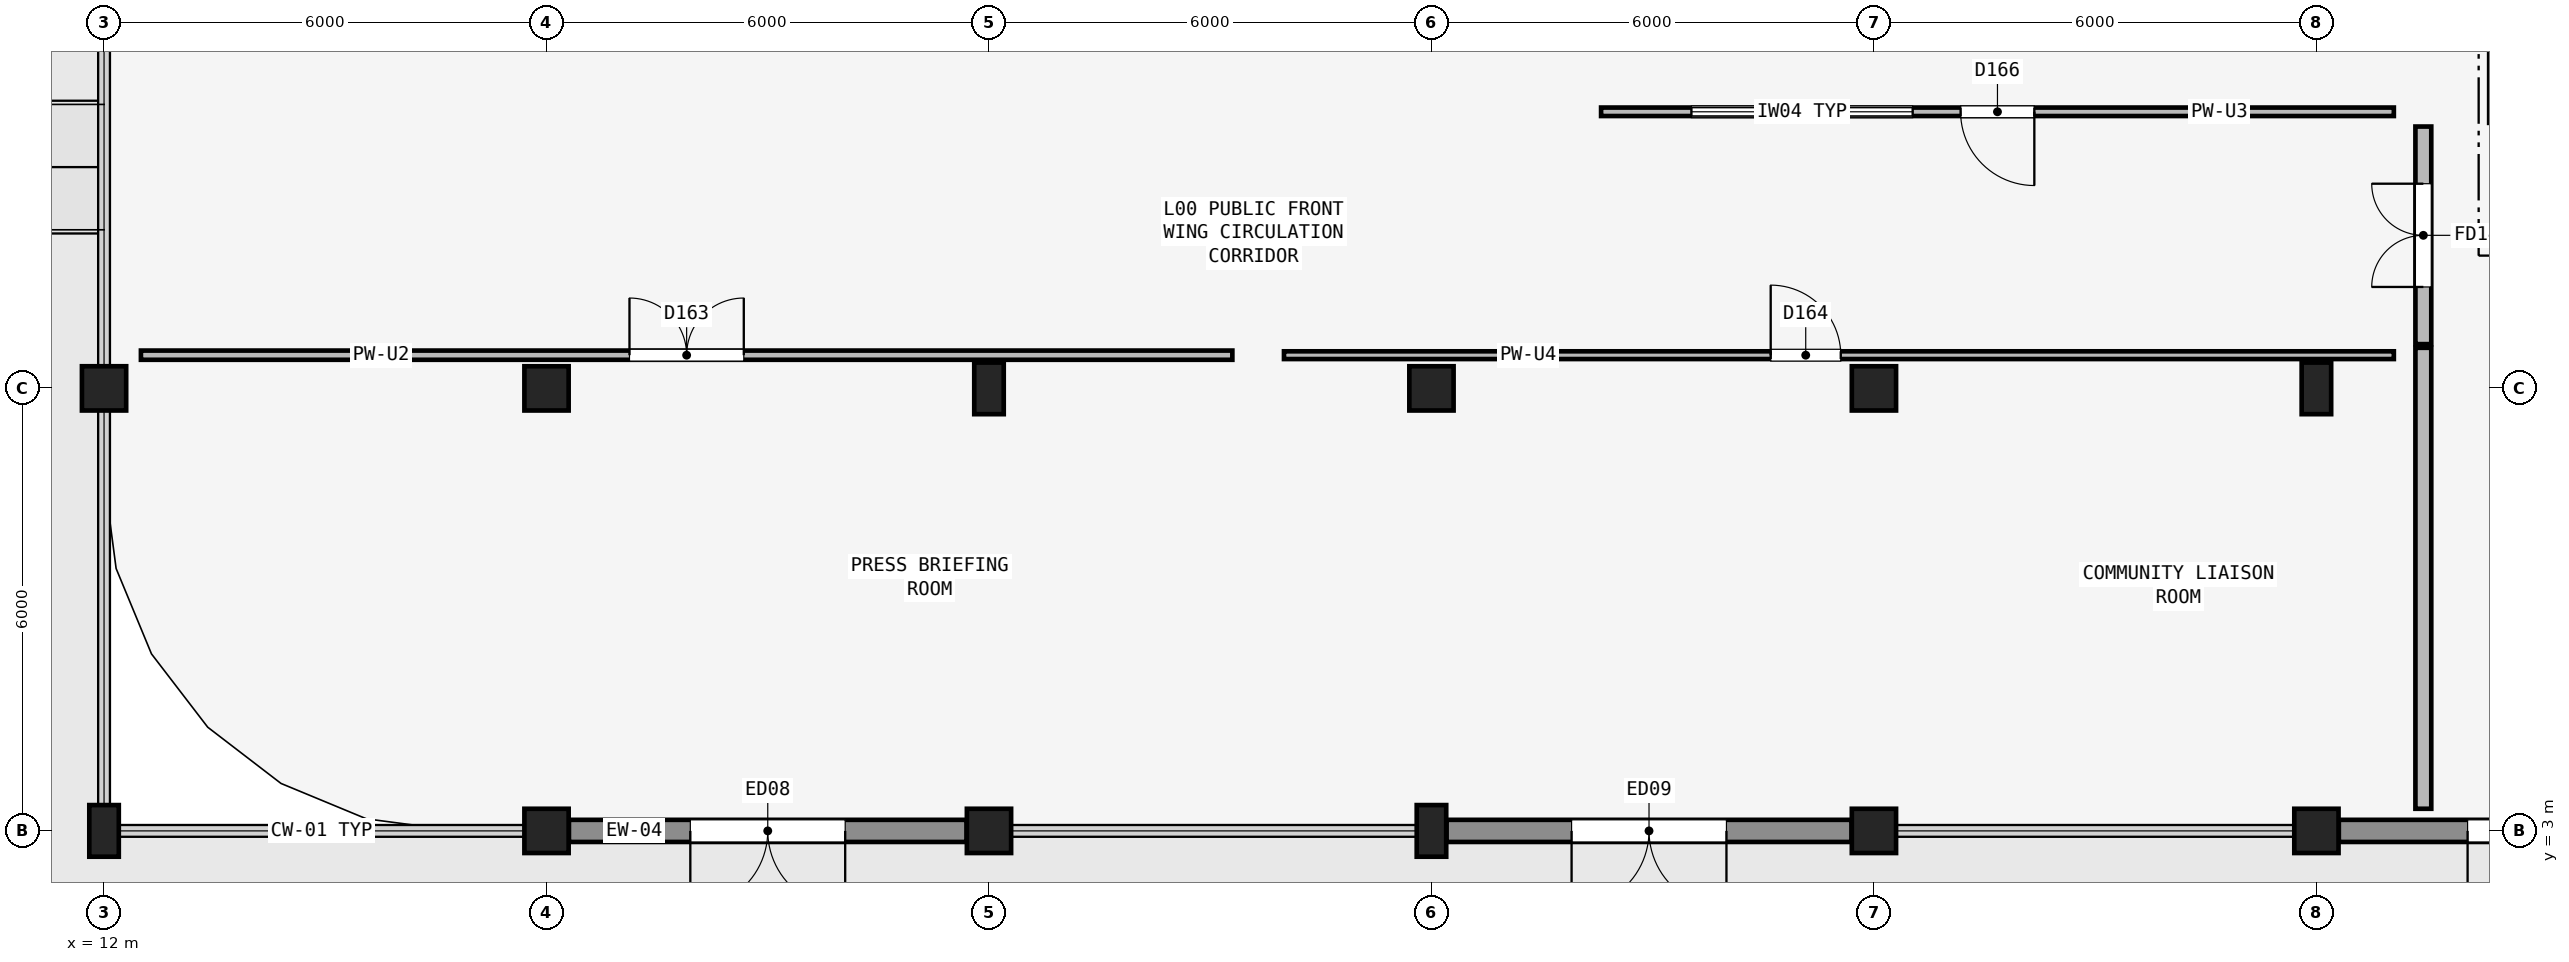
"""IFC4 building model, lengths in metres.
Left out: names, types, materials, properties, quantities, classifications, styles, units other than length and angle.
Written with IfcOpenShell. Run it as: python <this file> out.ifc"""

import sys

from ifc_helpers import new_model, si_unit, direction, frame, frame_2d, origin, origin_2d, place, context, subcontext, project, spatial, rectangle, extrude, element, fill, save


model = new_model("IFC4")
c1 = context("Model", 3, precision=1e-05, world=origin(), true_north=direction((0.0, 1.0)))
c2 = subcontext(c1, "Body", "Model", "MODEL_VIEW")
j1 = project(units=[si_unit("LENGTHUNIT", "METRE"), si_unit("PLANEANGLEUNIT", "RADIAN")], contexts=[c1])
p1 = place(None, origin())
s1 = spatial("IfcSite", under=j1, at=p1, CompositionType="ELEMENT")
p2 = place(p1, origin())
s2 = spatial("IfcBuilding", under=s1, at=p2, CompositionType="ELEMENT")
p3 = place(p2, origin())
s3 = spatial("IfcBuildingStorey", under=s2, at=p3, CompositionType="ELEMENT", Elevation=0.0)
p4 = place(p3, frame((12.0, 3.0, 0.0), z_axis=(0.0, 0.0, 1.0), x_axis=(1.0, 0.0, 0.0)))
e1 = element("IfcColumn", 1, at=p4, inside=s3, PredefinedType="COLUMN", context=c2, shape_type="SweptSolid", body=[
    extrude(rectangle(XDim=0.4, YDim=0.7, at=origin_2d()), origin(), (0.0, 0.0, 1.0), 4.8),
])
for number, where, z_axis, x_axis in (
    (2, (12.0, 9.0, 0.0), (0.0, 0.0, 1.0), (1.0, 0.0, 0.0)),
    (3, (18.0, 3.0, 0.0), (0.0, 0.0, 1.0), (1.0, 0.0, 0.0)),
    (4, (18.0, 9.0, 0.0), (0.0, 0.0, 1.0), (1.0, 0.0, 0.0)),
    (5, (24.0, 3.0, 0.0), (0.0, 0.0, 1.0), (1.0, 0.0, 0.0)),
):
    element("IfcColumn", number, at=place(p3, frame(where, z_axis=z_axis, x_axis=x_axis)), inside=s3, PredefinedType="COLUMN", context=c2, shape_type="SweptSolid", body=[
        extrude(rectangle(XDim=0.6, YDim=0.6, at=origin_2d()), origin(), (0.0, 0.0, 1.0), 4.8),
    ])
for number, where, z_axis, x_axis in (
    (6, (24.0, 9.0, 0.0), (0.0, 0.0, 1.0), (1.0, 0.0, 0.0)),
    (7, (30.0, 3.0, 0.0), (0.0, 0.0, 1.0), (1.0, 0.0, 0.0)),
):
    element("IfcColumn", number, at=place(p3, frame(where, z_axis=z_axis, x_axis=x_axis)), inside=s3, PredefinedType="COLUMN", context=c2, shape_type="SweptSolid", body=[
        extrude(rectangle(XDim=0.4, YDim=0.7, at=origin_2d()), origin(), (0.0, 0.0, 1.0), 4.8),
    ])
for number, where, z_axis, x_axis in (
    (8, (30.0, 9.0, 0.0), (0.0, 0.0, 1.0), (1.0, 0.0, 0.0)),
    (9, (36.0, 3.0, 0.0), (0.0, 0.0, 1.0), (1.0, 0.0, 0.0)),
    (10, (36.0, 9.0, 0.0), (0.0, 0.0, 1.0), (1.0, 0.0, 0.0)),
    (11, (42.0, 3.0, 0.0), (0.0, 0.0, 1.0), (1.0, 0.0, 0.0)),
):
    element("IfcColumn", number, at=place(p3, frame(where, z_axis=z_axis, x_axis=x_axis)), inside=s3, PredefinedType="COLUMN", context=c2, shape_type="SweptSolid", body=[
        extrude(rectangle(XDim=0.6, YDim=0.6, at=origin_2d()), origin(), (0.0, 0.0, 1.0), 4.8),
    ])
p5 = place(p3, frame((42.0, 9.0, 0.0), z_axis=(0.0, 0.0, 1.0), x_axis=(1.0, 0.0, 0.0)))
e12 = element("IfcColumn", 12, at=p5, inside=s3, PredefinedType="COLUMN", context=c2, shape_type="SweptSolid", body=[
    extrude(rectangle(XDim=0.4, YDim=0.7, at=origin_2d()), origin(), (0.0, 0.0, 1.0), 4.8),
])
p6 = place(p3, frame((18.304, 3.0, 0.0), z_axis=(0.0, 0.0, 1.0), x_axis=(1.0, 0.0, 0.0)))
e13 = element("IfcWall", 13, at=p6, inside=s3, PredefinedType="SOLIDWALL", context=c2, shape_type="SweptSolid", body=[
    extrude(rectangle(XDim=5.392, YDim=0.3, at=frame_2d((2.696, 0.0))), origin(), (0.0, 0.0, 1.0), 3.49),
])
p7 = place(p6, frame((1.646, 0.0, 0.0)))
e14 = element("IfcOpeningElement", 14, at=p7, cuts=e13, PredefinedType="OPENING", context=c2, shape_type="SweptSolid", body=[
    extrude(rectangle(XDim=2.1, YDim=2.4, at=frame_2d((1.05, 1.2))), frame((0.0, 0.16, 0.0), z_axis=(0.0, -1.0, 0.0), x_axis=(1.0, 0.0, 0.0)), (0.0, 0.0, 1.0), 0.32),
])
p8 = place(p3, frame((30.204, 3.0, 0.0), z_axis=(0.0, 0.0, 1.0), x_axis=(1.0, 0.0, 0.0)))
e15 = element("IfcWall", 15, at=p8, inside=s3, PredefinedType="SOLIDWALL", context=c2, shape_type="SweptSolid", body=[
    extrude(rectangle(XDim=5.492, YDim=0.3, at=frame_2d((2.746, 0.0))), origin(), (0.0, 0.0, 1.0), 4.04),
])
p9 = place(p8, frame((1.696, 0.0, 0.0)))
e16 = element("IfcOpeningElement", 16, at=p9, cuts=e15, PredefinedType="OPENING", context=c2, shape_type="SweptSolid", body=[
    extrude(rectangle(XDim=2.1, YDim=2.4, at=frame_2d((1.05, 1.2))), frame((0.0, 0.16, 0.0), z_axis=(0.0, -1.0, 0.0), x_axis=(1.0, 0.0, 0.0)), (0.0, 0.0, 1.0), 0.32),
])
p10 = place(p3, frame((42.304, 3.0, 0.0), z_axis=(0.0, 0.0, 1.0), x_axis=(1.0, 0.0, 0.0)))
e17 = element("IfcWall", 17, at=p10, inside=s3, PredefinedType="SOLIDWALL", context=c2, shape_type="SweptSolid", body=[
    extrude(rectangle(XDim=5.492, YDim=0.3, at=frame_2d((2.746, 0.0))), origin(), (0.0, 0.0, 1.0), 4.04),
])
p11 = place(p10, frame((1.746, 0.0, 0.0)))
e18 = element("IfcOpeningElement", 18, at=p11, cuts=e17, PredefinedType="OPENING", context=c2, shape_type="SweptSolid", body=[
    extrude(rectangle(XDim=2.0, YDim=2.4, at=frame_2d((1.0, 1.2))), frame((0.0, 0.16, 0.0), z_axis=(0.0, -1.0, 0.0), x_axis=(1.0, 0.0, 0.0)), (0.0, 0.0, 1.0), 0.32),
])
p12 = place(p3, frame((43.45, 3.3, 0.0), z_axis=(0.0, 0.0, 1.0), x_axis=(0.0, 1.0, 0.0)))
e19 = element("IfcWall", 19, at=p12, inside=s3, PredefinedType="PARTITIONING", context=c2, shape_type="SweptSolid", body=[
    extrude(rectangle(XDim=6.25, YDim=0.215, at=frame_2d((3.125, 0.0))), origin(), (0.0, 0.0, 1.0), 3.89),
])
p13 = place(p3, frame((43.45, 9.6, 0.0), z_axis=(0.0, 0.0, 1.0), x_axis=(0.0, 1.0, 0.0)))
e20 = element("IfcWall", 20, at=p13, inside=s3, PredefinedType="PARTITIONING", context=c2, shape_type="SweptSolid", body=[
    extrude(rectangle(XDim=2.95, YDim=0.215, at=frame_2d((1.475, 0.0))), origin(), (0.0, 0.0, 1.0), 4.49),
])
p14 = place(p13, frame((0.775, 0.0, 0.0)))
e21 = element("IfcOpeningElement", 21, at=p14, cuts=e20, PredefinedType="OPENING", context=c2, shape_type="SweptSolid", body=[
    extrude(rectangle(XDim=1.4, YDim=2.2, at=frame_2d((0.7, 1.1))), frame((0.0, 0.117, 0.0), z_axis=(0.0, -1.0, 0.0), x_axis=(1.0, 0.0, 0.0)), (0.0, 0.0, 1.0), 0.235),
])
p15 = place(p3, frame((44.45, 12.6, 0.0), z_axis=(0.0, 0.0, 1.0), x_axis=(0.0, 1.0, 0.0)))
e22 = element("IfcWall", 22, at=p15, inside=s3, PredefinedType="PARTITIONING", context=c2, shape_type="SweptSolid", body=[
    extrude(rectangle(XDim=3.65, YDim=0.215, at=frame_2d((1.825, 0.0))), origin(), (0.0, 0.0, 1.0), 3.89),
])
p16 = place(p3, frame((12.5, 9.45, 0.0), z_axis=(0.0, 0.0, 1.0), x_axis=(1.0, 0.0, 0.0)))
e23 = element("IfcWall", 23, at=p16, inside=s3, PredefinedType="PARTITIONING", context=c2, shape_type="SweptSolid", body=[
    extrude(rectangle(XDim=14.8, YDim=0.125, at=frame_2d((7.4, 0.0))), origin(), (0.0, 0.0, 1.0), 4.09),
])
p17 = place(p16, frame((6.625, 0.0, 0.0)))
e24 = element("IfcOpeningElement", 24, at=p17, cuts=e23, PredefinedType="OPENING", context=c2, shape_type="SweptSolid", body=[
    extrude(rectangle(XDim=1.55, YDim=2.2, at=frame_2d((0.775, 1.1))), frame((0.0, 0.073, 0.0), z_axis=(0.0, -1.0, 0.0), x_axis=(1.0, 0.0, 0.0)), (0.0, 0.0, 1.0), 0.145),
])
p18 = place(p3, frame((28.0, 9.45, 0.0), z_axis=(0.0, 0.0, 1.0), x_axis=(1.0, 0.0, 0.0)))
e25 = element("IfcWall", 25, at=p18, inside=s3, PredefinedType="PARTITIONING", context=c2, shape_type="SweptSolid", body=[
    extrude(rectangle(XDim=15.05, YDim=0.105, at=frame_2d((7.525, 0.0))), origin(), (0.0, 0.0, 1.0), 4.09),
])
p19 = place(p18, frame((6.6, 0.0, 0.0)))
e26 = element("IfcOpeningElement", 26, at=p19, cuts=e25, PredefinedType="OPENING", context=c2, shape_type="SweptSolid", body=[
    extrude(rectangle(XDim=0.95, YDim=2.15, at=frame_2d((0.475, 1.075))), frame((0.0, 0.062, 0.0), z_axis=(0.0, -1.0, 0.0), x_axis=(1.0, 0.0, 0.0)), (0.0, 0.0, 1.0), 0.125),
])
p20 = place(p3, frame((43.05, 12.75, 0.0), z_axis=(0.0, 0.0, 1.0), x_axis=(-1.0, 0.0, 0.0)))
e27 = element("IfcWall", 27, at=p20, inside=s3, PredefinedType="PARTITIONING", context=c2, shape_type="SweptSolid", body=[
    extrude(rectangle(XDim=10.75, YDim=0.115, at=frame_2d((5.375, 0.0))), origin(), (0.0, 0.0, 1.0), 4.09),
])
p21 = place(p20, frame((4.875, 0.0, 0.0)))
e28 = element("IfcOpeningElement", 28, at=p21, cuts=e27, PredefinedType="OPENING", context=c2, shape_type="SweptSolid", body=[
    extrude(rectangle(XDim=1.0, YDim=2.15, at=frame_2d((0.5, 1.075))), frame((0.0, 0.067, 0.0), z_axis=(0.0, -1.0, 0.0), x_axis=(1.0, 0.0, 0.0)), (0.0, 0.0, 1.0), 0.135),
])
p22 = place(p20, frame((6.525, 0.0, 0.95)))
e29 = element("IfcOpeningElement", 29, at=p22, cuts=e27, PredefinedType="OPENING", context=c2, shape_type="SweptSolid", body=[
    extrude(rectangle(XDim=3.0, YDim=1.3, at=frame_2d((1.5, 0.65))), frame((0.0, 0.067, 0.0), z_axis=(0.0, -1.0, 0.0), x_axis=(1.0, 0.0, 0.0)), (0.0, 0.0, 1.0), 0.135),
])
p23 = place(p7, frame((2.1, 0.0, 0.0), z_axis=(0.0, 0.0, 1.0), x_axis=(-1.0, 0.0, 0.0)))
e30 = element("IfcDoor", 30, at=p23, inside=s3, OperationType="DOUBLE_DOOR_SINGLE_SWING", PredefinedType="DOOR", context=c2, shape_type="SweptSolid", body=[
    extrude(rectangle(XDim=2.1, YDim=2.4, at=frame_2d((1.05, 1.2))), frame((0.0, 0.025, 0.0), z_axis=(0.0, -1.0, 0.0), x_axis=(1.0, 0.0, 0.0)), (0.0, 0.0, 1.0), 0.05),
])
fill(e14, e30)
p24 = place(p9, frame((2.1, 0.0, 0.0), z_axis=(0.0, 0.0, 1.0), x_axis=(-1.0, 0.0, 0.0)))
e31 = element("IfcDoor", 31, at=p24, inside=s3, OperationType="DOUBLE_DOOR_SINGLE_SWING", PredefinedType="DOOR", context=c2, shape_type="SweptSolid", body=[
    extrude(rectangle(XDim=2.1, YDim=2.4, at=frame_2d((1.05, 1.2))), frame((0.0, 0.025, 0.0), z_axis=(0.0, -1.0, 0.0), x_axis=(1.0, 0.0, 0.0)), (0.0, 0.0, 1.0), 0.05),
])
fill(e16, e31)
p25 = place(p11, frame((2.0, 0.0, 0.0), z_axis=(0.0, 0.0, 1.0), x_axis=(-1.0, 0.0, 0.0)))
e32 = element("IfcDoor", 32, at=p25, inside=s3, OperationType="DOUBLE_DOOR_SINGLE_SWING", PredefinedType="DOOR", context=c2, shape_type="SweptSolid", body=[
    extrude(rectangle(XDim=2.0, YDim=2.4, at=frame_2d((1.0, 1.2))), frame((0.0, 0.025, 0.0), z_axis=(0.0, -1.0, 0.0), x_axis=(1.0, 0.0, 0.0)), (0.0, 0.0, 1.0), 0.05),
])
fill(e18, e32)
p26 = place(p14, origin())
e33 = element("IfcDoor", 33, at=p26, inside=s3, OperationType="DOUBLE_DOOR_SINGLE_SWING", PredefinedType="DOOR", context=c2, shape_type="SweptSolid", body=[
    extrude(rectangle(XDim=1.4, YDim=2.2, at=frame_2d((0.7, 1.1))), frame((0.0, 0.025, 0.0), z_axis=(0.0, -1.0, 0.0), x_axis=(1.0, 0.0, 0.0)), (0.0, 0.0, 1.0), 0.05),
])
fill(e21, e33)
p27 = place(p17, origin())
e34 = element("IfcDoor", 34, at=p27, inside=s3, OperationType="DOUBLE_DOOR_SINGLE_SWING", PredefinedType="DOOR", context=c2, shape_type="SweptSolid", body=[
    extrude(rectangle(XDim=1.55, YDim=2.2, at=frame_2d((0.775, 1.1))), frame((0.0, 0.025, 0.0), z_axis=(0.0, -1.0, 0.0), x_axis=(1.0, 0.0, 0.0)), (0.0, 0.0, 1.0), 0.05),
])
fill(e24, e34)
p28 = place(p19, origin())
e35 = element("IfcDoor", 35, at=p28, inside=s3, OperationType="SINGLE_SWING_LEFT", PredefinedType="DOOR", context=c2, shape_type="SweptSolid", body=[
    extrude(rectangle(XDim=0.95, YDim=2.15, at=frame_2d((0.475, 1.075))), frame((0.0, 0.025, 0.0), z_axis=(0.0, -1.0, 0.0), x_axis=(1.0, 0.0, 0.0)), (0.0, 0.0, 1.0), 0.05),
])
fill(e26, e35)
p29 = place(p21, origin())
e36 = element("IfcDoor", 36, at=p29, inside=s3, OperationType="SINGLE_SWING_LEFT", PredefinedType="DOOR", context=c2, shape_type="SweptSolid", body=[
    extrude(rectangle(XDim=1.0, YDim=2.15, at=frame_2d((0.5, 1.075))), frame((0.0, 0.025, 0.0), z_axis=(0.0, -1.0, 0.0), x_axis=(1.0, 0.0, 0.0)), (0.0, 0.0, 1.0), 0.05),
])
fill(e28, e36)
p30 = place(p22, origin())
e37 = element("IfcWindow", 37, at=p30, inside=s3, PartitioningType="SINGLE_PANEL", PredefinedType="WINDOW", context=c2, shape_type="SweptSolid", body=[
    extrude(rectangle(XDim=3.0, YDim=1.3, at=frame_2d((1.5, 0.65))), frame((0.0, 0.03, 0.0), z_axis=(0.0, -1.0, 0.0), x_axis=(1.0, 0.0, 0.0)), (0.0, 0.0, 1.0), 0.06),
])
fill(e29, e37)
save(model, sys.argv[1])
